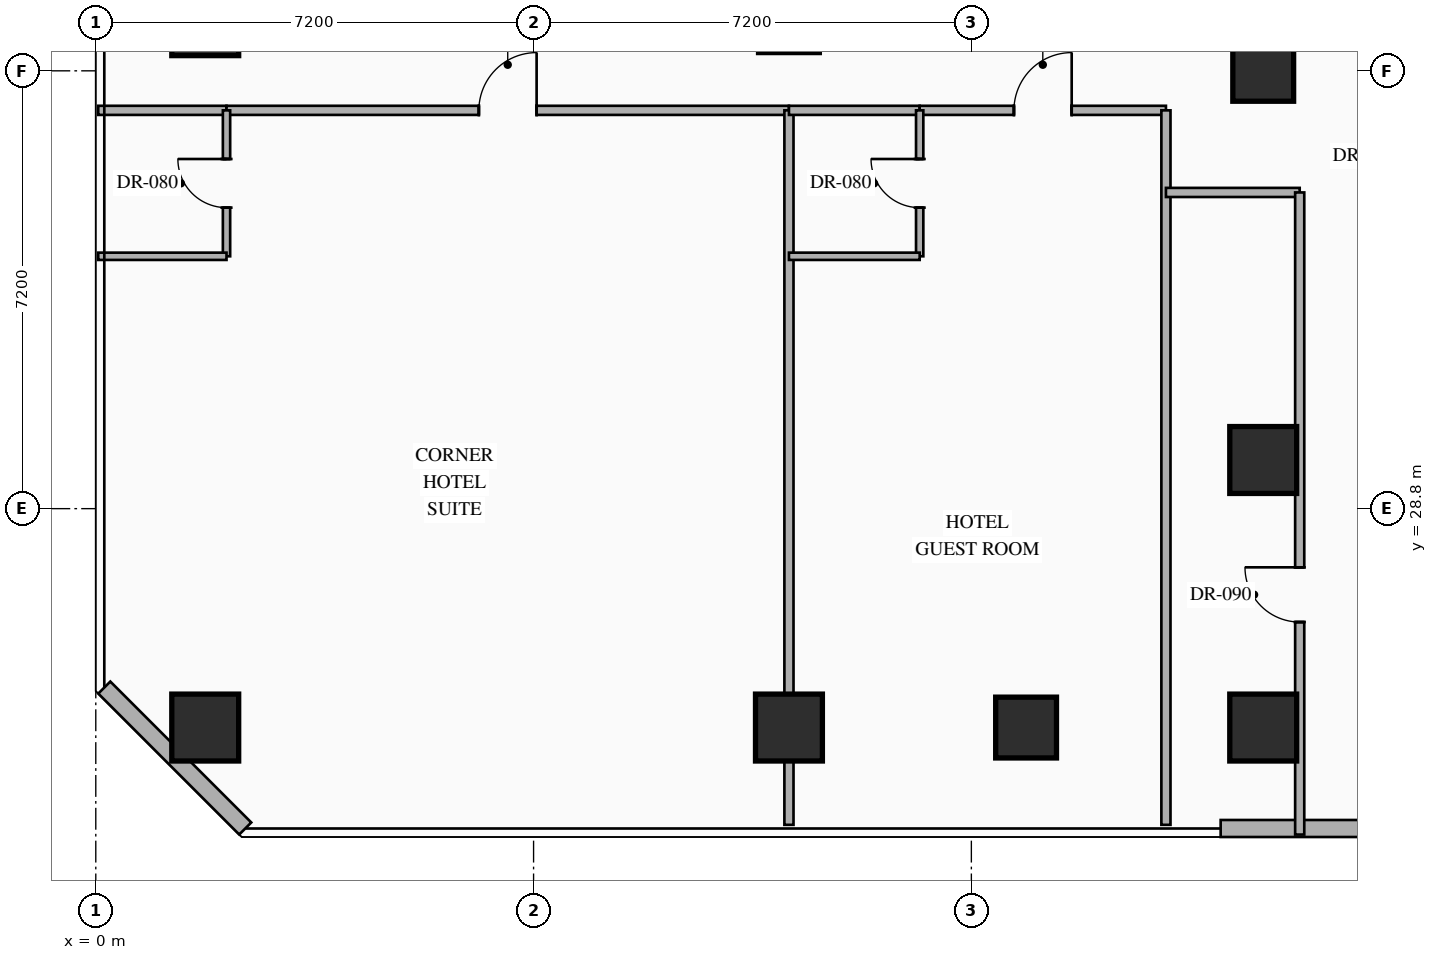
"""IFC4 building model, lengths in metres.
Left out: names, types, materials, properties, quantities, classifications, styles, units other than length and angle.
Written with IfcOpenShell. Run it as: python <this file> out.ifc"""

import sys

from ifc_helpers import new_model, si_unit, direction, frame, frame_2d, origin, origin_2d, place, context, subcontext, project, spatial, rectangle, hollow_rectangle, extrude, element, fill, save


model = new_model("IFC4")
c1 = context("Model", 3, precision=1e-05, world=origin(), true_north=direction((0.0, 1.0)))
c2 = subcontext(c1, "Body", "Model", "MODEL_VIEW")
j1 = project(units=[si_unit("LENGTHUNIT", "METRE"), si_unit("PLANEANGLEUNIT", "RADIAN")], contexts=[c1])
p1 = place(None, origin())
s1 = spatial("IfcSite", under=j1, at=p1, CompositionType="ELEMENT")
p2 = place(p1, origin())
s2 = spatial("IfcBuilding", under=s1, at=p2, CompositionType="ELEMENT")
p3 = place(p2, frame((0.0, 0.0, 53.35)))
s3 = spatial("IfcBuildingStorey", under=s2, at=p3, CompositionType="ELEMENT", Elevation=53.35)
for number, where, z_axis, x_axis in (
    (1, (1.8, 25.2, 0.0), (0.0, 0.0, 1.0), (1.0, 0.0, 0.0)),
    (2, (1.8, 36.8, 0.0), (0.0, 0.0, 1.0), (1.0, 0.0, 0.0)),
    (3, (11.4, 25.2, 0.0), (0.0, 0.0, 1.0), (1.0, 0.0, 0.0)),
    (4, (19.2, 25.2, 0.0), (0.0, 0.0, 1.0), (1.0, 0.0, 0.0)),
    (5, (19.2, 29.6, 0.0), (0.0, 0.0, 1.0), (1.0, 0.0, 0.0)),
):
    element("IfcColumn", number, at=place(p3, frame(where, z_axis=z_axis, x_axis=x_axis)), inside=s3, PredefinedType="COLUMN", context=c2, shape_type="SweptSolid", body=[
        extrude(hollow_rectangle(XDim=1.1, YDim=1.1, WallThickness=0.04, at=origin_2d()), origin(), (0.0, 0.0, 1.0), 3.35),
    ])
for number, where, z_axis, x_axis in (
    (6, (19.2, 36.0, 0.0), (0.0, 0.0, 1.0), (1.0, 0.0, 0.0)),
    (7, (15.3, 25.2, 0.0), (0.0, 0.0, 1.0), (1.0, 0.0, 0.0)),
):
    element("IfcColumn", number, at=place(p3, frame(where, z_axis=z_axis, x_axis=x_axis)), inside=s3, PredefinedType="COLUMN", context=c2, shape_type="SweptSolid", body=[
        extrude(hollow_rectangle(XDim=1.0, YDim=1.0, WallThickness=0.038, at=origin_2d()), origin(), (0.0, 0.0, 1.0), 3.35),
    ])
p4 = place(p3, frame((25.247, 23.54, 0.0), z_axis=(0.0, 0.0, 1.0), x_axis=(-1.0, 0.0, 0.0)))
e8 = element("IfcWall", 8, at=p4, inside=s3, PredefinedType="STANDARD", context=c2, shape_type="SweptSolid", body=[
    extrude(rectangle(XDim=6.747, YDim=0.28, at=frame_2d((3.374, 0.0))), origin(), (0.0, 0.0, 1.0), 3.13),
])
p5 = place(p3, frame((2.458, 23.54, 0.0), z_axis=(0.0, 0.0, 1.0), x_axis=(-0.707144017911, 0.707069542501, 0.0)))
e9 = element("IfcWall", 9, at=p5, inside=s3, PredefinedType="STANDARD", context=c2, shape_type="SweptSolid", body=[
    extrude(rectangle(XDim=3.278, YDim=0.28, at=frame_2d((1.639, 0.0))), origin(), (0.0, 0.0, 1.0), 3.13),
])
p6 = place(p3, frame((0.04, 35.35, 0.0), z_axis=(0.0, 0.0, 1.0), x_axis=(1.0, 0.0, 0.0)))
e10 = element("IfcWall", 10, at=p6, inside=s3, PredefinedType="PARTITIONING", context=c2, shape_type="SweptSolid", body=[
    extrude(rectangle(XDim=2.11, YDim=0.15, at=frame_2d((1.055, 0.0))), origin(), (0.0, 0.0, 1.0), 3.13),
])
p7 = place(p3, frame((2.15, 35.35, 0.0), z_axis=(0.0, 0.0, 1.0), x_axis=(1.0, 0.0, 0.0)))
e11 = element("IfcWall", 11, at=p7, inside=s3, PredefinedType="PARTITIONING", context=c2, shape_type="SweptSolid", body=[
    extrude(rectangle(XDim=9.25, YDim=0.15, at=frame_2d((4.625, 0.0))), origin(), (0.0, 0.0, 1.0), 3.13),
])
p8 = place(p7, frame((4.15, 0.0, 0.0)))
e12 = element("IfcOpeningElement", 12, at=p8, cuts=e11, PredefinedType="OPENING", context=c2, shape_type="SweptSolid", body=[
    extrude(rectangle(XDim=0.95, YDim=2.15, at=frame_2d((0.475, 1.075))), frame((0.0, 0.085, 0.0), z_axis=(0.0, -1.0, 0.0), x_axis=(1.0, 0.0, 0.0)), (0.0, 0.0, 1.0), 0.17),
])
p9 = place(p3, frame((2.15, 32.95, 0.0), z_axis=(0.0, 0.0, 1.0), x_axis=(0.0, 1.0, 0.0)))
e13 = element("IfcWall", 13, at=p9, inside=s3, PredefinedType="PARTITIONING", context=c2, shape_type="SweptSolid", body=[
    extrude(rectangle(XDim=2.4, YDim=0.12, at=frame_2d((1.2, 0.0))), origin(), (0.0, 0.0, 1.0), 3.13),
])
p10 = place(p9, frame((0.8, 0.0, 0.0)))
e14 = element("IfcOpeningElement", 14, at=p10, cuts=e13, PredefinedType="OPENING", context=c2, shape_type="SweptSolid", body=[
    extrude(rectangle(XDim=0.8, YDim=2.06, at=frame_2d((0.4, 1.03))), frame((0.0, 0.07, 0.0), z_axis=(0.0, -1.0, 0.0), x_axis=(1.0, 0.0, 0.0)), (0.0, 0.0, 1.0), 0.14),
])
p11 = place(p3, frame((0.04, 32.95, 0.0), z_axis=(0.0, 0.0, 1.0), x_axis=(1.0, 0.0, 0.0)))
e15 = element("IfcWall", 15, at=p11, inside=s3, PredefinedType="PARTITIONING", context=c2, shape_type="SweptSolid", body=[
    extrude(rectangle(XDim=2.11, YDim=0.12, at=frame_2d((1.055, 0.0))), origin(), (0.0, 0.0, 1.0), 3.13),
])
p12 = place(p3, frame((11.4, 23.6, 0.0), z_axis=(0.0, 0.0, 1.0), x_axis=(0.0, 1.0, 0.0)))
e16 = element("IfcWall", 16, at=p12, inside=s3, PredefinedType="PARTITIONING", context=c2, shape_type="SweptSolid", body=[
    extrude(rectangle(XDim=11.75, YDim=0.15, at=frame_2d((5.875, 0.0))), origin(), (0.0, 0.0, 1.0), 2.425),
])
p13 = place(p3, frame((11.4, 35.35, 0.0), z_axis=(0.0, 0.0, 1.0), x_axis=(1.0, 0.0, 0.0)))
e17 = element("IfcWall", 17, at=p13, inside=s3, PredefinedType="PARTITIONING", context=c2, shape_type="SweptSolid", body=[
    extrude(rectangle(XDim=2.15, YDim=0.15, at=frame_2d((1.075, 0.0))), origin(), (0.0, 0.0, 1.0), 3.13),
])
p14 = place(p3, frame((13.55, 35.35, 0.0), z_axis=(0.0, 0.0, 1.0), x_axis=(1.0, 0.0, 0.0)))
e18 = element("IfcWall", 18, at=p14, inside=s3, PredefinedType="PARTITIONING", context=c2, shape_type="SweptSolid", body=[
    extrude(rectangle(XDim=4.05, YDim=0.15, at=frame_2d((2.025, 0.0))), origin(), (0.0, 0.0, 1.0), 3.13),
])
p15 = place(p14, frame((1.55, 0.0, 0.0)))
e19 = element("IfcOpeningElement", 19, at=p15, cuts=e18, PredefinedType="OPENING", context=c2, shape_type="SweptSolid", body=[
    extrude(rectangle(XDim=0.95, YDim=2.15, at=frame_2d((0.475, 1.075))), frame((0.0, 0.085, 0.0), z_axis=(0.0, -1.0, 0.0), x_axis=(1.0, 0.0, 0.0)), (0.0, 0.0, 1.0), 0.17),
])
p16 = place(p3, frame((13.55, 32.95, 0.0), z_axis=(0.0, 0.0, 1.0), x_axis=(0.0, 1.0, 0.0)))
e20 = element("IfcWall", 20, at=p16, inside=s3, PredefinedType="PARTITIONING", context=c2, shape_type="SweptSolid", body=[
    extrude(rectangle(XDim=2.4, YDim=0.12, at=frame_2d((1.2, 0.0))), origin(), (0.0, 0.0, 1.0), 3.13),
])
p17 = place(p16, frame((0.8, 0.0, 0.0)))
e21 = element("IfcOpeningElement", 21, at=p17, cuts=e20, PredefinedType="OPENING", context=c2, shape_type="SweptSolid", body=[
    extrude(rectangle(XDim=0.8, YDim=2.06, at=frame_2d((0.4, 1.03))), frame((0.0, 0.07, 0.0), z_axis=(0.0, -1.0, 0.0), x_axis=(1.0, 0.0, 0.0)), (0.0, 0.0, 1.0), 0.14),
])
p18 = place(p3, frame((11.4, 32.95, 0.0), z_axis=(0.0, 0.0, 1.0), x_axis=(1.0, 0.0, 0.0)))
e22 = element("IfcWall", 22, at=p18, inside=s3, PredefinedType="PARTITIONING", context=c2, shape_type="SweptSolid", body=[
    extrude(rectangle(XDim=2.15, YDim=0.12, at=frame_2d((1.075, 0.0))), origin(), (0.0, 0.0, 1.0), 3.13),
])
p19 = place(p3, frame((17.6, 23.6, 0.0), z_axis=(0.0, 0.0, 1.0), x_axis=(0.0, 1.0, 0.0)))
e23 = element("IfcWall", 23, at=p19, inside=s3, PredefinedType="PARTITIONING", context=c2, shape_type="SweptSolid", body=[
    extrude(rectangle(XDim=11.75, YDim=0.15, at=frame_2d((5.875, 0.0))), origin(), (0.0, 0.0, 1.0), 3.13),
])
p20 = place(p3, frame((17.6, 34.0, 0.0), z_axis=(0.0, 0.0, 1.0), x_axis=(1.0, 0.0, 0.0)))
e24 = element("IfcWall", 24, at=p20, inside=s3, PredefinedType="PARTITIONING", context=c2, shape_type="SweptSolid", body=[
    extrude(rectangle(XDim=2.2, YDim=0.15, at=frame_2d((1.1, 0.0))), origin(), (0.0, 0.0, 1.0), 3.13),
])
p21 = place(p3, frame((19.8, 23.44, 0.0), z_axis=(0.0, 0.0, 1.0), x_axis=(0.0, 1.0, 0.0)))
e25 = element("IfcWall", 25, at=p21, inside=s3, PredefinedType="PARTITIONING", context=c2, shape_type="SweptSolid", body=[
    extrude(rectangle(XDim=10.56, YDim=0.15, at=frame_2d((5.28, 0.0))), origin(), (0.0, 0.0, 1.0), 3.13),
])
p22 = place(p21, frame((3.495, 0.0, 0.0)))
e26 = element("IfcOpeningElement", 26, at=p22, cuts=e25, PredefinedType="OPENING", context=c2, shape_type="SweptSolid", body=[
    extrude(rectangle(XDim=0.9, YDim=2.15, at=frame_2d((0.45, 1.075))), frame((0.0, 0.085, 0.0), z_axis=(0.0, -1.0, 0.0), x_axis=(1.0, 0.0, 0.0)), (0.0, 0.0, 1.0), 0.17),
])
p23 = place(p8, origin())
e27 = element("IfcDoor", 27, at=p23, inside=s3, OperationType="SINGLE_SWING_RIGHT", PredefinedType="DOOR", context=c2, shape_type="SweptSolid", body=[
    extrude(rectangle(XDim=0.95, YDim=2.15, at=frame_2d((0.475, 1.075))), frame((0.0, 0.025, 0.0), z_axis=(0.0, -1.0, 0.0), x_axis=(1.0, 0.0, 0.0)), (0.0, 0.0, 1.0), 0.05),
])
fill(e12, e27)
p24 = place(p10, origin())
e28 = element("IfcDoor", 28, at=p24, inside=s3, OperationType="SINGLE_SWING_RIGHT", PredefinedType="DOOR", context=c2, shape_type="SweptSolid", body=[
    extrude(rectangle(XDim=0.8, YDim=2.06, at=frame_2d((0.4, 1.03))), frame((0.0, 0.025, 0.0), z_axis=(0.0, -1.0, 0.0), x_axis=(1.0, 0.0, 0.0)), (0.0, 0.0, 1.0), 0.05),
])
fill(e14, e28)
p25 = place(p15, origin())
e29 = element("IfcDoor", 29, at=p25, inside=s3, OperationType="SINGLE_SWING_RIGHT", PredefinedType="DOOR", context=c2, shape_type="SweptSolid", body=[
    extrude(rectangle(XDim=0.95, YDim=2.15, at=frame_2d((0.475, 1.075))), frame((0.0, 0.025, 0.0), z_axis=(0.0, -1.0, 0.0), x_axis=(1.0, 0.0, 0.0)), (0.0, 0.0, 1.0), 0.05),
])
fill(e19, e29)
p26 = place(p17, origin())
e30 = element("IfcDoor", 30, at=p26, inside=s3, OperationType="SINGLE_SWING_RIGHT", PredefinedType="DOOR", context=c2, shape_type="SweptSolid", body=[
    extrude(rectangle(XDim=0.8, YDim=2.06, at=frame_2d((0.4, 1.03))), frame((0.0, 0.025, 0.0), z_axis=(0.0, -1.0, 0.0), x_axis=(1.0, 0.0, 0.0)), (0.0, 0.0, 1.0), 0.05),
])
fill(e21, e30)
p27 = place(p22, origin())
e31 = element("IfcDoor", 31, at=p27, inside=s3, OperationType="SINGLE_SWING_RIGHT", PredefinedType="DOOR", context=c2, shape_type="SweptSolid", body=[
    extrude(rectangle(XDim=0.9, YDim=2.15, at=frame_2d((0.45, 1.075))), frame((0.0, 0.025, 0.0), z_axis=(0.0, -1.0, 0.0), x_axis=(1.0, 0.0, 0.0)), (0.0, 0.0, 1.0), 0.05),
])
fill(e26, e31)
save(model, sys.argv[1])
